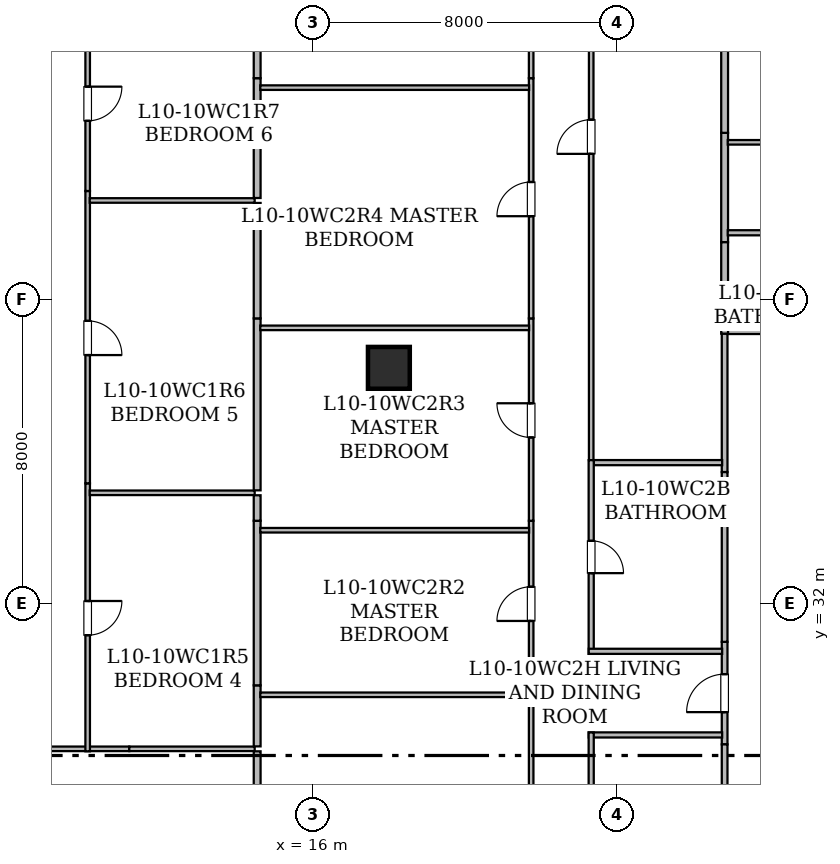
"""IFC4 building model, lengths in metres.
Left out: names, types, materials, properties, quantities, classifications, styles, units other than length and angle.
Written with IfcOpenShell. Run it as: python <this file> out.ifc"""

import sys

from ifc_helpers import new_model, si_unit, direction, frame, frame_2d, origin, origin_2d, place, context, subcontext, project, spatial, rectangle, hollow_rectangle, extrude, element, fill, save


model = new_model("IFC4")
c1 = context("Model", 3, precision=1e-05, world=origin(), true_north=direction((0.0, 1.0)))
c2 = subcontext(c1, "Body", "Model", "MODEL_VIEW")
j1 = project(units=[si_unit("LENGTHUNIT", "METRE"), si_unit("PLANEANGLEUNIT", "RADIAN")], contexts=[c1])
p1 = place(None, origin())
s1 = spatial("IfcSite", under=j1, at=p1, CompositionType="ELEMENT")
p2 = place(p1, origin())
s2 = spatial("IfcBuilding", under=s1, at=p2, CompositionType="ELEMENT")
p3 = place(p2, frame((0.0, 0.0, 44.25)))
s3 = spatial("IfcBuildingStorey", under=s2, at=p3, CompositionType="ELEMENT", Elevation=44.25)
p4 = place(p3, frame((18.0, 38.2, 0.0), z_axis=(0.0, 0.0, 1.0), x_axis=(1.0, 0.0, 0.0)))
e1 = element("IfcColumn", 1, at=p4, inside=s3, PredefinedType="COLUMN", context=c2, shape_type="SweptSolid", body=[
    extrude(hollow_rectangle(XDim=1.1, YDim=1.1, WallThickness=0.055, at=origin_2d()), origin(), (0.0, 0.0, 1.0), 3.65),
])
p5 = place(p3, frame((26.835, 35.457, 0.0), z_axis=(0.0, 0.0, 1.0), x_axis=(0.0, 1.0, 0.0)))
e2 = element("IfcWall", 2, at=p5, inside=s3, PredefinedType="STANDARD", context=c2, shape_type="SweptSolid", body=[
    extrude(rectangle(XDim=3.643, YDim=0.15, at=frame_2d((1.822, 0.0))), origin(), (0.0, 0.0, 1.0), 2.647),
])
p6 = place(p3, frame((26.835, 28.292, 0.0), z_axis=(0.0, 0.0, 1.0), x_axis=(0.0, 1.0, 0.0)))
e3 = element("IfcWall", 3, at=p6, inside=s3, PredefinedType="STANDARD", context=c2, shape_type="SweptSolid", body=[
    extrude(rectangle(XDim=2.698, YDim=0.15, at=frame_2d((1.349, 0.0))), origin(), (0.0, 0.0, 1.0), 3.43),
])
p7 = place(p6, frame((0.849, 0.0, 0.0)))
e4 = element("IfcOpeningElement", 4, at=p7, cuts=e3, PredefinedType="OPENING", context=c2, shape_type="SweptSolid", body=[
    extrude(rectangle(XDim=1.0, YDim=2.15, at=frame_2d((0.5, 1.075))), frame((0.0, 0.085, 0.0), z_axis=(0.0, -1.0, 0.0), x_axis=(1.0, 0.0, 0.0)), (0.0, 0.0, 1.0), 0.17),
])
p8 = place(p3, frame((26.835, 30.99, 0.0), z_axis=(0.0, 0.0, 1.0), x_axis=(0.0, 1.0, 0.0)))
e5 = element("IfcWall", 5, at=p8, inside=s3, PredefinedType="STANDARD", context=c2, shape_type="SweptSolid", body=[
    extrude(rectangle(XDim=4.467, YDim=0.15, at=frame_2d((2.233, 0.0))), origin(), (0.0, 0.0, 1.0), 3.43),
])
p9 = place(p3, frame((26.835, 22.15, 0.0), z_axis=(0.0, 0.0, 1.0), x_axis=(0.0, 1.0, 0.0)))
e6 = element("IfcWall", 6, at=p9, inside=s3, PredefinedType="STANDARD", context=c2, shape_type="SweptSolid", body=[
    extrude(rectangle(XDim=6.142, YDim=0.15, at=frame_2d((3.071, 0.0))), origin(), (0.0, 0.0, 1.0), 2.957),
])
p10 = place(p3, frame((26.9, 39.165, 0.0), z_axis=(0.0, 0.0, 1.0), x_axis=(1.0, 0.0, 0.0)))
e7 = element("IfcWall", 7, at=p10, inside=s3, PredefinedType="STANDARD", context=c2, shape_type="SweptSolid", body=[
    extrude(rectangle(XDim=4.701, YDim=0.15, at=frame_2d((2.351, 0.0))), origin(), (0.0, 0.0, 1.0), 2.647),
])
p11 = place(p3, frame((6.518, 28.175, 0.0), z_axis=(0.0, 0.0, 1.0), x_axis=(1.0, 0.0, 0.0)))
e8 = element("IfcWall", 8, at=p11, inside=s3, PredefinedType="PARTITIONING", context=c2, shape_type="SweptSolid", body=[
    extrude(rectangle(XDim=4.651, YDim=0.12, at=frame_2d((2.325, 0.0))), origin(), (0.0, 0.0, 1.0), 3.43),
])
p12 = place(p11, frame((0.647, 0.0, 0.0)))
e9 = element("IfcOpeningElement", 9, at=p12, cuts=e8, PredefinedType="OPENING", context=c2, shape_type="SweptSolid", body=[
    extrude(rectangle(XDim=0.9, YDim=2.1, at=frame_2d((0.45, 1.05))), frame((0.0, 0.07, 0.0), z_axis=(0.0, -1.0, 0.0), x_axis=(1.0, 0.0, 0.0)), (0.0, 0.0, 1.0), 0.14),
])
p13 = place(p3, frame((10.074, 35.161, 0.0), z_axis=(0.0, 0.0, 1.0), x_axis=(0.0, -1.0, 0.0)))
e10 = element("IfcWall", 10, at=p13, inside=s3, PredefinedType="PARTITIONING", context=c2, shape_type="SweptSolid", body=[
    extrude(rectangle(XDim=7.051, YDim=0.12, at=frame_2d((3.525, 0.0))), origin(), (0.0, 0.0, 1.0), 3.43),
])
p14 = place(p13, frame((3.096, 0.0, 0.0)))
e11 = element("IfcOpeningElement", 11, at=p14, cuts=e10, PredefinedType="OPENING", context=c2, shape_type="SweptSolid", body=[
    extrude(rectangle(XDim=0.9, YDim=2.1, at=frame_2d((0.45, 1.05))), frame((0.0, 0.07, 0.0), z_axis=(0.0, -1.0, 0.0), x_axis=(1.0, 0.0, 0.0)), (0.0, 0.0, 1.0), 0.14),
])
p15 = place(p3, frame((11.169, 28.175, 0.0), z_axis=(0.0, 0.0, 1.0), x_axis=(1.0, 0.0, 0.0)))
e12 = element("IfcWall", 12, at=p15, inside=s3, PredefinedType="PARTITIONING", context=c2, shape_type="SweptSolid", body=[
    extrude(rectangle(XDim=3.3, YDim=0.12, at=frame_2d((1.65, 0.0))), origin(), (0.0, 0.0, 1.0), 3.43),
])
p16 = place(p3, frame((10.074, 42.853, 0.0), z_axis=(0.0, 0.0, 1.0), x_axis=(0.0, -1.0, 0.0)))
e13 = element("IfcWall", 13, at=p16, inside=s3, PredefinedType="PARTITIONING", context=c2, shape_type="SweptSolid", body=[
    extrude(rectangle(XDim=7.692, YDim=0.12, at=frame_2d((3.846, 0.0))), origin(), (0.0, 0.0, 1.0), 2.647),
])
p17 = place(p16, frame((3.417, 0.0, 0.0)))
e14 = element("IfcOpeningElement", 14, at=p17, cuts=e13, PredefinedType="OPENING", context=c2, shape_type="SweptSolid", body=[
    extrude(rectangle(XDim=0.9, YDim=2.1, at=frame_2d((0.45, 1.05))), frame((0.0, 0.07, 0.0), z_axis=(0.0, -1.0, 0.0), x_axis=(1.0, 0.0, 0.0)), (0.0, 0.0, 1.0), 0.14),
])
p18 = place(p3, frame((10.074, 47.486, 0.0), z_axis=(0.0, 0.0, 1.0), x_axis=(0.0, -1.0, 0.0)))
e15 = element("IfcWall", 15, at=p18, inside=s3, PredefinedType="PARTITIONING", context=c2, shape_type="SweptSolid", body=[
    extrude(rectangle(XDim=4.633, YDim=0.12, at=frame_2d((2.316, 0.0))), origin(), (0.0, 0.0, 1.0), 3.43),
])
p19 = place(p18, frame((1.887, 0.0, 0.0)))
e16 = element("IfcOpeningElement", 16, at=p19, cuts=e15, PredefinedType="OPENING", context=c2, shape_type="SweptSolid", body=[
    extrude(rectangle(XDim=0.9, YDim=2.1, at=frame_2d((0.45, 1.05))), frame((0.0, 0.07, 0.0), z_axis=(0.0, -1.0, 0.0), x_axis=(1.0, 0.0, 0.0)), (0.0, 0.0, 1.0), 0.14),
])
p20 = place(p3, frame((14.534, 28.11, 0.0), z_axis=(0.0, 0.0, 1.0), x_axis=(0.0, -1.0, 0.0)))
e17 = element("IfcWall", 17, at=p20, inside=s3, PredefinedType="STANDARD", context=c2, shape_type="SweptSolid", body=[
    extrude(rectangle(XDim=2.25, YDim=0.18, at=frame_2d((1.125, 0.0))), origin(), (0.0, 0.0, 1.0), 3.43),
])
p21 = place(p3, frame((10.128, 34.912, 0.0), z_axis=(0.0, 0.0, 1.0), x_axis=(1.0, 0.0, 0.0)))
e18 = element("IfcWall", 18, at=p21, inside=s3, PredefinedType="PARTITIONING", context=c2, shape_type="SweptSolid", body=[
    extrude(rectangle(XDim=4.341, YDim=0.12, at=frame_2d((2.17, 0.0))), origin(), (0.0, 0.0, 1.0), 3.43),
])
p22 = place(p3, frame((14.534, 29.846, 0.0), z_axis=(0.0, 0.0, 1.0), x_axis=(0.0, -1.0, 0.0)))
e19 = element("IfcWall", 19, at=p22, inside=s3, PredefinedType="STANDARD", context=c2, shape_type="SweptSolid", body=[
    extrude(rectangle(XDim=1.606, YDim=0.18, at=frame_2d((0.803, 0.0))), origin(), (0.0, 0.0, 1.0), 3.43),
])
p23 = place(p3, frame((14.534, 34.176, 0.0), z_axis=(0.0, 0.0, 1.0), x_axis=(0.0, -1.0, 0.0)))
e20 = element("IfcWall", 20, at=p23, inside=s3, PredefinedType="STANDARD", context=c2, shape_type="SweptSolid", body=[
    extrude(rectangle(XDim=4.33, YDim=0.18, at=frame_2d((2.165, 0.0))), origin(), (0.0, 0.0, 1.0), 3.43),
])
p24 = place(p3, frame((14.534, 34.847, 0.0), z_axis=(0.0, 0.0, 1.0), x_axis=(0.0, -1.0, 0.0)))
e21 = element("IfcWall", 21, at=p24, inside=s3, PredefinedType="STANDARD", context=c2, shape_type="SweptSolid", body=[
    extrude(rectangle(XDim=0.671, YDim=0.18, at=frame_2d((0.335, 0.0))), origin(), (0.0, 0.0, 1.0), 3.43),
])
p25 = place(p3, frame((10.128, 42.604, 0.0), z_axis=(0.0, 0.0, 1.0), x_axis=(1.0, 0.0, 0.0)))
e22 = element("IfcWall", 22, at=p25, inside=s3, PredefinedType="PARTITIONING", context=c2, shape_type="SweptSolid", body=[
    extrude(rectangle(XDim=4.341, YDim=0.12, at=frame_2d((2.17, 0.0))), origin(), (0.0, 0.0, 1.0), 2.957),
])
p26 = place(p3, frame((14.534, 39.501, 0.0), z_axis=(0.0, 0.0, 1.0), x_axis=(0.0, -1.0, 0.0)))
e23 = element("IfcWall", 23, at=p26, inside=s3, PredefinedType="STANDARD", context=c2, shape_type="SweptSolid", body=[
    extrude(rectangle(XDim=4.524, YDim=0.18, at=frame_2d((2.262, 0.0))), origin(), (0.0, 0.0, 1.0), 2.647),
])
p27 = place(p3, frame((14.534, 42.539, 0.0), z_axis=(0.0, 0.0, 1.0), x_axis=(0.0, -1.0, 0.0)))
e24 = element("IfcWall", 24, at=p27, inside=s3, PredefinedType="STANDARD", context=c2, shape_type="SweptSolid", body=[
    extrude(rectangle(XDim=3.038, YDim=0.18, at=frame_2d((1.519, 0.0))), origin(), (0.0, 0.0, 1.0), 2.957),
])
p28 = place(p3, frame((14.534, 45.822, 0.0), z_axis=(0.0, 0.0, 1.0), x_axis=(0.0, -1.0, 0.0)))
e25 = element("IfcWall", 25, at=p28, inside=s3, PredefinedType="STANDARD", context=c2, shape_type="SweptSolid", body=[
    extrude(rectangle(XDim=3.153, YDim=0.18, at=frame_2d((1.577, 0.0))), origin(), (0.0, 0.0, 1.0), 2.647),
])
p29 = place(p3, frame((14.534, 47.172, 0.0), z_axis=(0.0, 0.0, 1.0), x_axis=(0.0, -1.0, 0.0)))
e26 = element("IfcWall", 26, at=p29, inside=s3, PredefinedType="STANDARD", context=c2, shape_type="SweptSolid", body=[
    extrude(rectangle(XDim=1.35, YDim=0.18, at=frame_2d((0.675, 0.0))), origin(), (0.0, 0.0, 1.0), 3.43),
])
p30 = place(p3, frame((23.324, 35.771, 0.0), z_axis=(0.0, 0.0, 1.0), x_axis=(0.0, 1.0, 0.0)))
e27 = element("IfcWall", 27, at=p30, inside=s3, PredefinedType="PARTITIONING", context=c2, shape_type="SweptSolid", body=[
    extrude(rectangle(XDim=17.017, YDim=0.12, at=frame_2d((8.509, 0.0))), origin(), (0.0, 0.0, 1.0), 2.647),
])
p31 = place(p30, frame((8.059, 0.0, 0.0)))
e28 = element("IfcOpeningElement", 28, at=p31, cuts=e27, PredefinedType="OPENING", context=c2, shape_type="SweptSolid", body=[
    extrude(rectangle(XDim=0.9, YDim=2.1, at=frame_2d((0.45, 1.05))), frame((0.0, 0.07, 0.0), z_axis=(0.0, -1.0, 0.0), x_axis=(1.0, 0.0, 0.0)), (0.0, 0.0, 1.0), 0.14),
])
p32 = place(p3, frame((26.77, 35.706, 0.0), z_axis=(0.0, 0.0, 1.0), x_axis=(-1.0, 0.0, 0.0)))
e29 = element("IfcWall", 29, at=p32, inside=s3, PredefinedType="PARTITIONING", context=c2, shape_type="SweptSolid", body=[
    extrude(rectangle(XDim=3.381, YDim=0.135, at=frame_2d((1.69, 0.0))), origin(), (0.0, 0.0, 1.0), 3.43),
])
p33 = place(p3, frame((26.835, 44.383, 0.0), z_axis=(0.0, 0.0, 1.0), x_axis=(0.0, -1.0, 0.0)))
e30 = element("IfcWall", 30, at=p33, inside=s3, PredefinedType="STANDARD", context=c2, shape_type="SweptSolid", body=[
    extrude(rectangle(XDim=2.878, YDim=0.18, at=frame_2d((1.439, 0.0))), origin(), (0.0, 0.0, 1.0), 2.957),
])
p34 = place(p3, frame((26.835, 41.505, 0.0), z_axis=(0.0, 0.0, 1.0), x_axis=(0.0, -1.0, 0.0)))
e31 = element("IfcWall", 31, at=p34, inside=s3, PredefinedType="STANDARD", context=c2, shape_type="SweptSolid", body=[
    extrude(rectangle(XDim=2.405, YDim=0.18, at=frame_2d((1.202, 0.0))), origin(), (0.0, 0.0, 1.0), 3.43),
])
p35 = place(p3, frame((26.835, 52.788, 0.0), z_axis=(0.0, 0.0, 1.0), x_axis=(0.0, -1.0, 0.0)))
e32 = element("IfcWall", 32, at=p35, inside=s3, PredefinedType="STANDARD", context=c2, shape_type="SweptSolid", body=[
    extrude(rectangle(XDim=8.405, YDim=0.18, at=frame_2d((4.203, 0.0))), origin(), (0.0, 0.0, 1.0), 2.803),
])
p36 = place(p3, frame((23.324, 35.771, 0.0), z_axis=(0.0, 0.0, 1.0), x_axis=(0.0, -1.0, 0.0)))
e33 = element("IfcWall", 33, at=p36, inside=s3, PredefinedType="PARTITIONING", context=c2, shape_type="SweptSolid", body=[
    extrude(rectangle(XDim=5.095, YDim=0.135, at=frame_2d((2.547, 0.0))), origin(), (0.0, 0.0, 1.0), 3.43),
])
p37 = place(p36, frame((2.123, 0.0, 0.0)))
e34 = element("IfcOpeningElement", 34, at=p37, cuts=e33, PredefinedType="OPENING", context=c2, shape_type="SweptSolid", body=[
    extrude(rectangle(XDim=0.85, YDim=2.1, at=frame_2d((0.425, 1.05))), frame((0.0, 0.077, 0.0), z_axis=(0.0, -1.0, 0.0), x_axis=(1.0, 0.0, 0.0)), (0.0, 0.0, 1.0), 0.155),
])
for number, where, z_axis, x_axis in (
    (35, (23.259, 30.741, 0.0), (0.0, 0.0, 1.0), (1.0, 0.0, 0.0)),
    (36, (26.77, 28.541, 0.0), (0.0, 0.0, 1.0), (-1.0, 0.0, 0.0)),
):
    element("IfcWall", number, at=place(p3, frame(where, z_axis=z_axis, x_axis=x_axis)), inside=s3, PredefinedType="PARTITIONING", context=c2, shape_type="SweptSolid", body=[
        extrude(rectangle(XDim=3.511, YDim=0.135, at=frame_2d((1.755, 0.0))), origin(), (0.0, 0.0, 1.0), 3.43),
    ])
p38 = place(p3, frame((23.324, 28.606, 0.0), z_axis=(0.0, 0.0, 1.0), x_axis=(0.0, -1.0, 0.0)))
e37 = element("IfcWall", 37, at=p38, inside=s3, PredefinedType="PARTITIONING", context=c2, shape_type="SweptSolid", body=[
    extrude(rectangle(XDim=6.326, YDim=0.135, at=frame_2d((3.163, 0.0))), origin(), (0.0, 0.0, 1.0), 2.957),
])
p39 = place(p38, frame((2.738, 0.0, 0.0)))
e38 = element("IfcOpeningElement", 38, at=p39, cuts=e37, PredefinedType="OPENING", context=c2, shape_type="SweptSolid", body=[
    extrude(rectangle(XDim=0.85, YDim=2.1, at=frame_2d((0.425, 1.05))), frame((0.0, 0.077, 0.0), z_axis=(0.0, -1.0, 0.0), x_axis=(1.0, 0.0, 0.0)), (0.0, 0.0, 1.0), 0.155),
])
p40 = place(p3, frame((21.744, 22.28, 0.0), z_axis=(0.0, 0.0, 1.0), x_axis=(0.0, 1.0, 0.0)))
e39 = element("IfcWall", 39, at=p40, inside=s3, PredefinedType="PARTITIONING", context=c2, shape_type="SweptSolid", body=[
    extrude(rectangle(XDim=7.566, YDim=0.12, at=frame_2d((3.783, 0.0))), origin(), (0.0, 0.0, 1.0), 2.957),
])
p41 = place(p40, frame((3.312, 0.0, 0.0)))
e40 = element("IfcOpeningElement", 40, at=p41, cuts=e39, PredefinedType="OPENING", context=c2, shape_type="SweptSolid", body=[
    extrude(rectangle(XDim=0.9, YDim=2.1, at=frame_2d((0.45, 1.05))), frame((0.0, 0.07, 0.0), z_axis=(0.0, -1.0, 0.0), x_axis=(1.0, 0.0, 0.0)), (0.0, 0.0, 1.0), 0.14),
])
p42 = place(p3, frame((21.744, 29.846, 0.0), z_axis=(0.0, 0.0, 1.0), x_axis=(0.0, 1.0, 0.0)))
e41 = element("IfcWall", 41, at=p42, inside=s3, PredefinedType="PARTITIONING", context=c2, shape_type="SweptSolid", body=[
    extrude(rectangle(XDim=4.33, YDim=0.12, at=frame_2d((2.165, 0.0))), origin(), (0.0, 0.0, 1.0), 3.43),
])
p43 = place(p42, frame((1.694, 0.0, 0.0)))
e42 = element("IfcOpeningElement", 42, at=p43, cuts=e41, PredefinedType="OPENING", context=c2, shape_type="SweptSolid", body=[
    extrude(rectangle(XDim=0.9, YDim=2.1, at=frame_2d((0.45, 1.05))), frame((0.0, 0.07, 0.0), z_axis=(0.0, -1.0, 0.0), x_axis=(1.0, 0.0, 0.0)), (0.0, 0.0, 1.0), 0.14),
])
p44 = place(p3, frame((21.744, 34.176, 0.0), z_axis=(0.0, 0.0, 1.0), x_axis=(0.0, 1.0, 0.0)))
e43 = element("IfcWall", 43, at=p44, inside=s3, PredefinedType="PARTITIONING", context=c2, shape_type="SweptSolid", body=[
    extrude(rectangle(XDim=5.325, YDim=0.12, at=frame_2d((2.663, 0.0))), origin(), (0.0, 0.0, 1.0), 2.647),
])
p45 = place(p44, frame((2.192, 0.0, 0.0)))
e44 = element("IfcOpeningElement", 44, at=p45, cuts=e43, PredefinedType="OPENING", context=c2, shape_type="SweptSolid", body=[
    extrude(rectangle(XDim=0.9, YDim=2.1, at=frame_2d((0.45, 1.05))), frame((0.0, 0.07, 0.0), z_axis=(0.0, -1.0, 0.0), x_axis=(1.0, 0.0, 0.0)), (0.0, 0.0, 1.0), 0.14),
])
p46 = place(p3, frame((21.744, 39.501, 0.0), z_axis=(0.0, 0.0, 1.0), x_axis=(0.0, 1.0, 0.0)))
e45 = element("IfcWall", 45, at=p46, inside=s3, PredefinedType="PARTITIONING", context=c2, shape_type="SweptSolid", body=[
    extrude(rectangle(XDim=6.321, YDim=0.12, at=frame_2d((3.161, 0.0))), origin(), (0.0, 0.0, 1.0), 2.957),
])
p47 = place(p46, frame((2.689, 0.0, 0.0)))
e46 = element("IfcOpeningElement", 46, at=p47, cuts=e45, PredefinedType="OPENING", context=c2, shape_type="SweptSolid", body=[
    extrude(rectangle(XDim=0.9, YDim=2.1, at=frame_2d((0.45, 1.05))), frame((0.0, 0.07, 0.0), z_axis=(0.0, -1.0, 0.0), x_axis=(1.0, 0.0, 0.0)), (0.0, 0.0, 1.0), 0.14),
])
p48 = place(p3, frame((21.744, 45.822, 0.0), z_axis=(0.0, 0.0, 1.0), x_axis=(0.0, 1.0, 0.0)))
e47 = element("IfcWall", 47, at=p48, inside=s3, PredefinedType="PARTITIONING", context=c2, shape_type="SweptSolid", body=[
    extrude(rectangle(XDim=6.966, YDim=0.12, at=frame_2d((3.483, 0.0))), origin(), (0.0, 0.0, 1.0), 2.803),
])
p49 = place(p48, frame((3.033, 0.0, 0.0)))
e48 = element("IfcOpeningElement", 48, at=p49, cuts=e47, PredefinedType="OPENING", context=c2, shape_type="SweptSolid", body=[
    extrude(rectangle(XDim=0.9, YDim=2.1, at=frame_2d((0.45, 1.05))), frame((0.0, 0.07, 0.0), z_axis=(0.0, -1.0, 0.0), x_axis=(1.0, 0.0, 0.0)), (0.0, 0.0, 1.0), 0.14),
])
for number, where, z_axis, x_axis in (
    (49, (14.616, 29.597, 0.0), (0.0, 0.0, 1.0), (1.0, 0.0, 0.0)),
    (50, (14.616, 33.927, 0.0), (0.0, 0.0, 1.0), (1.0, 0.0, 0.0)),
    (51, (14.616, 39.252, 0.0), (0.0, 0.0, 1.0), (1.0, 0.0, 0.0)),
    (52, (14.616, 45.573, 0.0), (0.0, 0.0, 1.0), (1.0, 0.0, 0.0)),
):
    element("IfcWall", number, at=place(p3, frame(where, z_axis=z_axis, x_axis=x_axis)), inside=s3, PredefinedType="PARTITIONING", context=c2, shape_type="SweptSolid", body=[
        extrude(rectangle(XDim=7.074, YDim=0.12, at=frame_2d((3.537, 0.0))), origin(), (0.0, 0.0, 1.0), 2.647),
    ])
p50 = place(p3, frame((31.915, 41.754, 0.0), z_axis=(0.0, 0.0, 1.0), x_axis=(-1.0, 0.0, 0.0)))
e53 = element("IfcWall", 53, at=p50, inside=s3, PredefinedType="PARTITIONING", context=c2, shape_type="SweptSolid", body=[
    extrude(rectangle(XDim=4.998, YDim=0.135, at=frame_2d((2.499, 0.0))), origin(), (0.0, 0.0, 1.0), 2.647),
])
p51 = place(p50, frame((2.074, 0.0, 0.0)))
e54 = element("IfcOpeningElement", 54, at=p51, cuts=e53, PredefinedType="OPENING", context=c2, shape_type="SweptSolid", body=[
    extrude(rectangle(XDim=0.85, YDim=2.1, at=frame_2d((0.425, 1.05))), frame((0.0, 0.077, 0.0), z_axis=(0.0, -1.0, 0.0), x_axis=(1.0, 0.0, 0.0)), (0.0, 0.0, 1.0), 0.155),
])
p52 = place(p3, frame((26.917, 44.134, 0.0), z_axis=(0.0, 0.0, 1.0), x_axis=(1.0, 0.0, 0.0)))
e55 = element("IfcWall", 55, at=p52, inside=s3, PredefinedType="PARTITIONING", context=c2, shape_type="SweptSolid", body=[
    extrude(rectangle(XDim=6.463, YDim=0.12, at=frame_2d((3.231, 0.0))), origin(), (0.0, 0.0, 1.0), 2.647),
])
p53 = place(p7, origin())
e56 = element("IfcDoor", 56, at=p53, inside=s3, OperationType="SINGLE_SWING_LEFT", PredefinedType="DOOR", context=c2, shape_type="SweptSolid", body=[
    extrude(rectangle(XDim=1.0, YDim=2.15, at=frame_2d((0.5, 1.075))), frame((0.0, 0.025, 0.0), z_axis=(0.0, -1.0, 0.0), x_axis=(1.0, 0.0, 0.0)), (0.0, 0.0, 1.0), 0.05),
])
fill(e4, e56)
p54 = place(p14, origin())
e57 = element("IfcDoor", 57, at=p54, inside=s3, OperationType="SINGLE_SWING_LEFT", PredefinedType="DOOR", context=c2, shape_type="SweptSolid", body=[
    extrude(rectangle(XDim=0.9, YDim=2.1, at=frame_2d((0.45, 1.05))), frame((0.0, 0.025, 0.0), z_axis=(0.0, -1.0, 0.0), x_axis=(1.0, 0.0, 0.0)), (0.0, 0.0, 1.0), 0.05),
])
fill(e11, e57)
p55 = place(p17, origin())
e58 = element("IfcDoor", 58, at=p55, inside=s3, OperationType="SINGLE_SWING_RIGHT", PredefinedType="DOOR", context=c2, shape_type="SweptSolid", body=[
    extrude(rectangle(XDim=0.9, YDim=2.1, at=frame_2d((0.45, 1.05))), frame((0.0, 0.025, 0.0), z_axis=(0.0, -1.0, 0.0), x_axis=(1.0, 0.0, 0.0)), (0.0, 0.0, 1.0), 0.05),
])
fill(e14, e58)
p56 = place(p19, origin())
e59 = element("IfcDoor", 59, at=p56, inside=s3, OperationType="SINGLE_SWING_LEFT", PredefinedType="DOOR", context=c2, shape_type="SweptSolid", body=[
    extrude(rectangle(XDim=0.9, YDim=2.1, at=frame_2d((0.45, 1.05))), frame((0.0, 0.025, 0.0), z_axis=(0.0, -1.0, 0.0), x_axis=(1.0, 0.0, 0.0)), (0.0, 0.0, 1.0), 0.05),
])
fill(e16, e59)
p57 = place(p31, origin())
e60 = element("IfcDoor", 60, at=p57, inside=s3, OperationType="SINGLE_SWING_LEFT", PredefinedType="DOOR", context=c2, shape_type="SweptSolid", body=[
    extrude(rectangle(XDim=0.9, YDim=2.1, at=frame_2d((0.45, 1.05))), frame((0.0, 0.025, 0.0), z_axis=(0.0, -1.0, 0.0), x_axis=(1.0, 0.0, 0.0)), (0.0, 0.0, 1.0), 0.05),
])
fill(e28, e60)
p58 = place(p37, origin())
e61 = element("IfcDoor", 61, at=p58, inside=s3, OperationType="SINGLE_SWING_RIGHT", PredefinedType="DOOR", context=c2, shape_type="SweptSolid", body=[
    extrude(rectangle(XDim=0.85, YDim=2.1, at=frame_2d((0.425, 1.05))), frame((0.0, 0.025, 0.0), z_axis=(0.0, -1.0, 0.0), x_axis=(1.0, 0.0, 0.0)), (0.0, 0.0, 1.0), 0.05),
])
fill(e34, e61)
p59 = place(p43, origin())
e62 = element("IfcDoor", 62, at=p59, inside=s3, OperationType="SINGLE_SWING_LEFT", PredefinedType="DOOR", context=c2, shape_type="SweptSolid", body=[
    extrude(rectangle(XDim=0.9, YDim=2.1, at=frame_2d((0.45, 1.05))), frame((0.0, 0.025, 0.0), z_axis=(0.0, -1.0, 0.0), x_axis=(1.0, 0.0, 0.0)), (0.0, 0.0, 1.0), 0.05),
])
fill(e42, e62)
p60 = place(p45, origin())
e63 = element("IfcDoor", 63, at=p60, inside=s3, OperationType="SINGLE_SWING_RIGHT", PredefinedType="DOOR", context=c2, shape_type="SweptSolid", body=[
    extrude(rectangle(XDim=0.9, YDim=2.1, at=frame_2d((0.45, 1.05))), frame((0.0, 0.025, 0.0), z_axis=(0.0, -1.0, 0.0), x_axis=(1.0, 0.0, 0.0)), (0.0, 0.0, 1.0), 0.05),
])
fill(e44, e63)
p61 = place(p47, origin())
e64 = element("IfcDoor", 64, at=p61, inside=s3, OperationType="SINGLE_SWING_LEFT", PredefinedType="DOOR", context=c2, shape_type="SweptSolid", body=[
    extrude(rectangle(XDim=0.9, YDim=2.1, at=frame_2d((0.45, 1.05))), frame((0.0, 0.025, 0.0), z_axis=(0.0, -1.0, 0.0), x_axis=(1.0, 0.0, 0.0)), (0.0, 0.0, 1.0), 0.05),
])
fill(e46, e64)
save(model, sys.argv[1])
